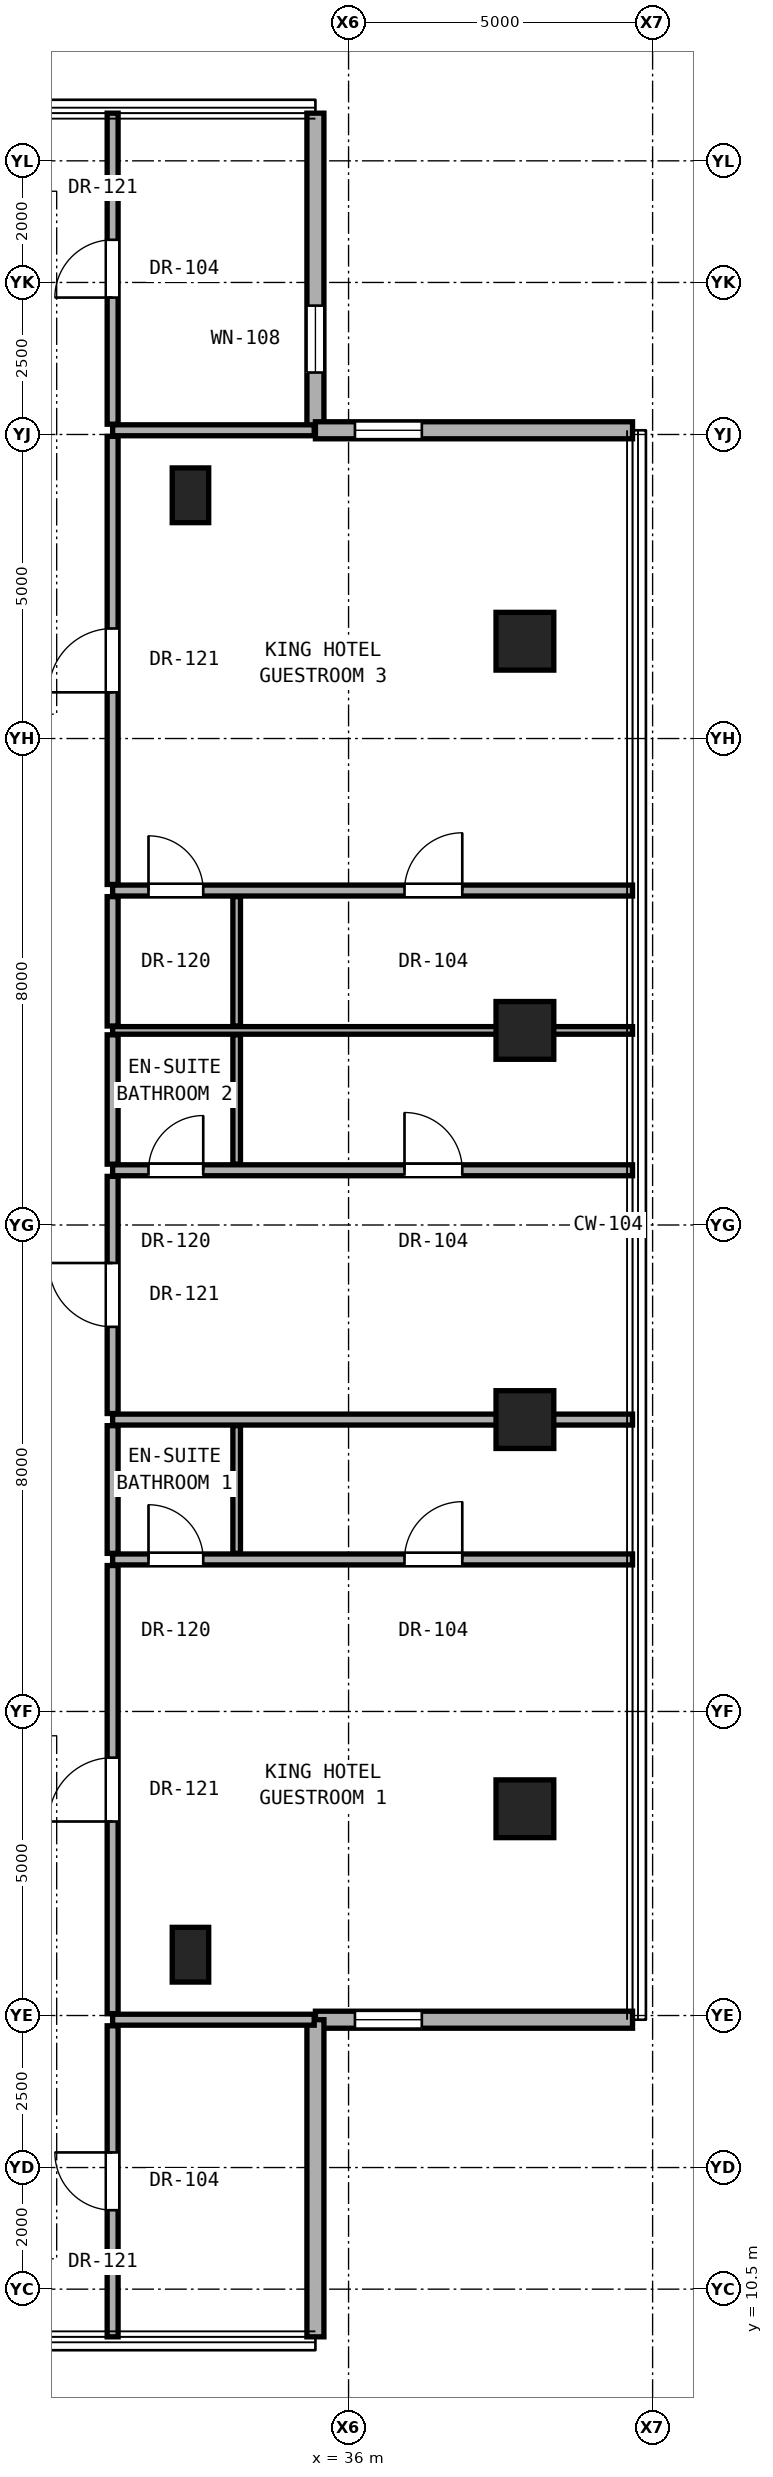
"""IFC4 building model, lengths in metres.
Left out: names, types, materials, properties, quantities, classifications, styles, units other than length and angle.
Written with IfcOpenShell. Run it as: python <this file> out.ifc"""

import sys

from ifc_helpers import new_model, si_unit, direction, frame, frame_2d, origin, origin_2d, place, context, subcontext, project, spatial, rectangle, hollow_rectangle, extrude, element, fill, save


model = new_model("IFC4")
c1 = context("Model", 3, precision=1e-05, world=origin(), true_north=direction((0.0, 1.0)))
c2 = subcontext(c1, "Body", "Model", "MODEL_VIEW")
j1 = project(units=[si_unit("LENGTHUNIT", "METRE"), si_unit("PLANEANGLEUNIT", "RADIAN")], contexts=[c1])
p1 = place(None, origin())
s1 = spatial("IfcSite", under=j1, at=p1, CompositionType="ELEMENT")
p2 = place(p1, origin())
s2 = spatial("IfcBuilding", under=s1, at=p2, CompositionType="ELEMENT")
p3 = place(p2, frame((0.0, 0.0, 193.4)))
s3 = spatial("IfcBuildingStorey", under=s2, at=p3, CompositionType="ELEMENT", Elevation=193.4)
for number, where, z_axis, x_axis in (
    (1, (38.9, 18.4, 0.0), (0.0, 0.0, 1.0), (1.0, 0.0, 0.0)),
    (2, (38.9, 24.8, 0.0), (0.0, 0.0, 1.0), (1.0, 0.0, 0.0)),
    (3, (38.9, 31.2, 0.0), (0.0, 0.0, 1.0), (1.0, 0.0, 0.0)),
    (4, (38.9, 37.6, 0.0), (0.0, 0.0, 1.0), (1.0, 0.0, 0.0)),
):
    element("IfcColumn", number, at=place(p3, frame(where, z_axis=z_axis, x_axis=x_axis)), inside=s3, PredefinedType="COLUMN", context=c2, shape_type="SweptSolid", body=[
        extrude(hollow_rectangle(XDim=0.95, YDim=0.95, WallThickness=0.05, at=origin_2d()), origin(), (0.0, 0.0, 1.0), 3.25),
    ])
for number, where, z_axis, x_axis in (
    (5, (33.4, 16.0, 0.0), (0.0, 0.0, 1.0), (1.0, 0.0, 0.0)),
    (6, (33.4, 40.0, 0.0), (0.0, 0.0, 1.0), (1.0, 0.0, 0.0)),
):
    element("IfcColumn", number, at=place(p3, frame(where, z_axis=z_axis, x_axis=x_axis)), inside=s3, PredefinedType="PILASTER", context=c2, shape_type="SweptSolid", body=[
        extrude(rectangle(XDim=0.6, YDim=0.9, at=origin_2d()), origin(), (0.0, 0.0, 1.0), 3.25),
    ])
p4 = place(p3, frame((35.455, 41.069, 0.0), z_axis=(0.0, 0.0, 1.0), x_axis=(0.0, 1.0, 0.0)))
e7 = element("IfcWall", 7, at=p4, inside=s3, PredefinedType="SOLIDWALL", context=c2, shape_type="SweptSolid", body=[
    extrude(rectangle(XDim=5.215, YDim=0.28, at=frame_2d((2.607, 0.0))), origin(), (0.0, 0.0, 1.0), 3.03),
])
p5 = place(p4, frame((0.95, 0.0, 0.85)))
e8 = element("IfcOpeningElement", 8, at=p5, cuts=e7, PredefinedType="OPENING", context=c2, shape_type="SweptSolid", body=[
    extrude(rectangle(XDim=1.1, YDim=2.0, at=frame_2d((0.55, 1.0))), frame((0.0, 0.15, 0.0), z_axis=(0.0, -1.0, 0.0), x_axis=(1.0, 0.0, 0.0)), (0.0, 0.0, 1.0), 0.3),
])
p6 = place(p3, frame((35.455, 14.931, 0.0), z_axis=(0.0, 0.0, 1.0), x_axis=(1.0, 0.0, 0.0)))
e9 = element("IfcWall", 9, at=p6, inside=s3, PredefinedType="SOLIDWALL", context=c2, shape_type="SweptSolid", body=[
    extrude(rectangle(XDim=5.215, YDim=0.28, at=frame_2d((2.607, 0.0))), origin(), (0.0, 0.0, 1.0), 3.03),
])
p7 = place(p6, frame((0.65, 0.0, 0.85)))
e10 = element("IfcOpeningElement", 10, at=p7, cuts=e9, PredefinedType="OPENING", context=c2, shape_type="SweptSolid", body=[
    extrude(rectangle(XDim=1.1, YDim=2.0, at=frame_2d((0.55, 1.0))), frame((0.0, 0.15, 0.0), z_axis=(0.0, -1.0, 0.0), x_axis=(1.0, 0.0, 0.0)), (0.0, 0.0, 1.0), 0.3),
])
p8 = place(p3, frame((35.455, 9.716, 0.0), z_axis=(0.0, 0.0, 1.0), x_axis=(0.0, 1.0, 0.0)))
e11 = element("IfcWall", 11, at=p8, inside=s3, PredefinedType="SOLIDWALL", context=c2, shape_type="SweptSolid", body=[
    extrude(rectangle(XDim=5.215, YDim=0.28, at=frame_2d((2.607, 0.0))), origin(), (0.0, 0.0, 1.0), 3.03),
])
p9 = place(p3, frame((40.67, 41.069, 0.0), z_axis=(0.0, 0.0, 1.0), x_axis=(-1.0, 0.0, 0.0)))
e12 = element("IfcWall", 12, at=p9, inside=s3, PredefinedType="SOLIDWALL", context=c2, shape_type="SweptSolid", body=[
    extrude(rectangle(XDim=5.215, YDim=0.28, at=frame_2d((2.607, 0.0))), origin(), (0.0, 0.0, 1.0), 3.03),
])
p10 = place(p9, frame((3.465, 0.0, 0.85)))
e13 = element("IfcOpeningElement", 13, at=p10, cuts=e12, PredefinedType="OPENING", context=c2, shape_type="SweptSolid", body=[
    extrude(rectangle(XDim=1.1, YDim=2.0, at=frame_2d((0.55, 1.0))), frame((0.0, 0.15, 0.0), z_axis=(0.0, -1.0, 0.0), x_axis=(1.0, 0.0, 0.0)), (0.0, 0.0, 1.0), 0.3),
])
p11 = place(p3, frame((32.12, 14.931, 0.0), z_axis=(0.0, 0.0, 1.0), x_axis=(1.0, 0.0, 0.0)))
e14 = element("IfcWall", 14, at=p11, inside=s3, PredefinedType="PARTITIONING", context=c2, shape_type="SweptSolid", body=[
    extrude(rectangle(XDim=3.315, YDim=0.18, at=frame_2d((1.657, 0.0))), origin(), (0.0, 0.0, 1.0), 3.05),
])
p12 = place(p3, frame((32.12, 22.5, 0.0), z_axis=(0.0, 0.0, 1.0), x_axis=(1.0, 0.0, 0.0)))
e15 = element("IfcWall", 15, at=p12, inside=s3, PredefinedType="PARTITIONING", context=c2, shape_type="SweptSolid", body=[
    extrude(rectangle(XDim=8.55, YDim=0.18, at=frame_2d((4.275, 0.0))), origin(), (0.0, 0.0, 1.0), 2.269),
])
p13 = place(p12, frame((4.8, 0.0, 0.0)))
e16 = element("IfcOpeningElement", 16, at=p13, cuts=e15, PredefinedType="OPENING", context=c2, shape_type="SweptSolid", body=[
    extrude(rectangle(XDim=0.95, YDim=2.15, at=frame_2d((0.475, 1.075))), frame((0.0, 0.1, 0.0), z_axis=(0.0, -1.0, 0.0), x_axis=(1.0, 0.0, 0.0)), (0.0, 0.0, 1.0), 0.2),
])
p14 = place(p12, frame((0.59, 0.0, 0.0)))
e17 = element("IfcOpeningElement", 17, at=p14, cuts=e15, PredefinedType="OPENING", context=c2, shape_type="SweptSolid", body=[
    extrude(rectangle(XDim=0.9, YDim=2.1, at=frame_2d((0.45, 1.05))), frame((0.0, 0.1, 0.0), z_axis=(0.0, -1.0, 0.0), x_axis=(1.0, 0.0, 0.0)), (0.0, 0.0, 1.0), 0.2),
])
p15 = place(p3, frame((32.12, 24.8, 0.0), z_axis=(0.0, 0.0, 1.0), x_axis=(1.0, 0.0, 0.0)))
e18 = element("IfcWall", 18, at=p15, inside=s3, PredefinedType="PARTITIONING", context=c2, shape_type="SweptSolid", body=[
    extrude(rectangle(XDim=8.55, YDim=0.18, at=frame_2d((4.275, 0.0))), origin(), (0.0, 0.0, 1.0), 2.269),
])
p16 = place(p3, frame((32.12, 28.9, 0.0), z_axis=(0.0, 0.0, 1.0), x_axis=(1.0, 0.0, 0.0)))
e19 = element("IfcWall", 19, at=p16, inside=s3, PredefinedType="PARTITIONING", context=c2, shape_type="SweptSolid", body=[
    extrude(rectangle(XDim=8.55, YDim=0.18, at=frame_2d((4.275, 0.0))), origin(), (0.0, 0.0, 1.0), 2.269),
])
p17 = place(p16, frame((4.8, 0.0, 0.0)))
e20 = element("IfcOpeningElement", 20, at=p17, cuts=e19, PredefinedType="OPENING", context=c2, shape_type="SweptSolid", body=[
    extrude(rectangle(XDim=0.95, YDim=2.15, at=frame_2d((0.475, 1.075))), frame((0.0, 0.1, 0.0), z_axis=(0.0, -1.0, 0.0), x_axis=(1.0, 0.0, 0.0)), (0.0, 0.0, 1.0), 0.2),
])
p18 = place(p16, frame((0.59, 0.0, 0.0)))
e21 = element("IfcOpeningElement", 21, at=p18, cuts=e19, PredefinedType="OPENING", context=c2, shape_type="SweptSolid", body=[
    extrude(rectangle(XDim=0.9, YDim=2.1, at=frame_2d((0.45, 1.05))), frame((0.0, 0.1, 0.0), z_axis=(0.0, -1.0, 0.0), x_axis=(1.0, 0.0, 0.0)), (0.0, 0.0, 1.0), 0.2),
])
p19 = place(p3, frame((32.12, 31.2, 0.0), z_axis=(0.0, 0.0, 1.0), x_axis=(1.0, 0.0, 0.0)))
e22 = element("IfcWall", 22, at=p19, inside=s3, PredefinedType="PARTITIONING", context=c2, shape_type="SweptSolid", body=[
    extrude(rectangle(XDim=8.55, YDim=0.125, at=frame_2d((4.275, 0.0))), origin(), (0.0, 0.0, 1.0), 2.269),
])
p20 = place(p3, frame((32.12, 33.5, 0.0), z_axis=(0.0, 0.0, 1.0), x_axis=(1.0, 0.0, 0.0)))
e23 = element("IfcWall", 23, at=p20, inside=s3, PredefinedType="PARTITIONING", context=c2, shape_type="SweptSolid", body=[
    extrude(rectangle(XDim=8.55, YDim=0.18, at=frame_2d((4.275, 0.0))), origin(), (0.0, 0.0, 1.0), 2.269),
])
p21 = place(p20, frame((4.8, 0.0, 0.0)))
e24 = element("IfcOpeningElement", 24, at=p21, cuts=e23, PredefinedType="OPENING", context=c2, shape_type="SweptSolid", body=[
    extrude(rectangle(XDim=0.95, YDim=2.15, at=frame_2d((0.475, 1.075))), frame((0.0, 0.1, 0.0), z_axis=(0.0, -1.0, 0.0), x_axis=(1.0, 0.0, 0.0)), (0.0, 0.0, 1.0), 0.2),
])
p22 = place(p20, frame((0.59, 0.0, 0.0)))
e25 = element("IfcOpeningElement", 25, at=p22, cuts=e23, PredefinedType="OPENING", context=c2, shape_type="SweptSolid", body=[
    extrude(rectangle(XDim=0.9, YDim=2.1, at=frame_2d((0.45, 1.05))), frame((0.0, 0.1, 0.0), z_axis=(0.0, -1.0, 0.0), x_axis=(1.0, 0.0, 0.0)), (0.0, 0.0, 1.0), 0.2),
])
p23 = place(p3, frame((32.12, 41.069, 0.0), z_axis=(0.0, 0.0, 1.0), x_axis=(1.0, 0.0, 0.0)))
e26 = element("IfcWall", 26, at=p23, inside=s3, PredefinedType="PARTITIONING", context=c2, shape_type="SweptSolid", body=[
    extrude(rectangle(XDim=3.315, YDim=0.18, at=frame_2d((1.657, 0.0))), origin(), (0.0, 0.0, 1.0), 3.05),
])
p24 = place(p3, frame((32.12, 9.716, 0.0), z_axis=(0.0, 0.0, 1.0), x_axis=(0.0, 1.0, 0.0)))
e27 = element("IfcWall", 27, at=p24, inside=s3, PredefinedType="PARTITIONING", context=c2, shape_type="SweptSolid", body=[
    extrude(rectangle(XDim=5.115, YDim=0.18, at=frame_2d((2.558, 0.0))), origin(), (0.0, 0.0, 1.0), 3.05),
])
p25 = place(p24, frame((2.083, 0.0, 0.0)))
e28 = element("IfcOpeningElement", 28, at=p25, cuts=e27, PredefinedType="OPENING", context=c2, shape_type="SweptSolid", body=[
    extrude(rectangle(XDim=0.95, YDim=2.15, at=frame_2d((0.475, 1.075))), frame((0.0, 0.1, 0.0), z_axis=(0.0, -1.0, 0.0), x_axis=(1.0, 0.0, 0.0)), (0.0, 0.0, 1.0), 0.2),
])
p26 = place(p3, frame((32.12, 15.031, 0.0), z_axis=(0.0, 0.0, 1.0), x_axis=(0.0, 1.0, 0.0)))
e29 = element("IfcWall", 29, at=p26, inside=s3, PredefinedType="PARTITIONING", context=c2, shape_type="SweptSolid", body=[
    extrude(rectangle(XDim=7.369, YDim=0.18, at=frame_2d((3.685, 0.0))), origin(), (0.0, 0.0, 1.0), 2.442),
])
p27 = place(p26, frame((3.159, 0.0, 0.0)))
e30 = element("IfcOpeningElement", 30, at=p27, cuts=e29, PredefinedType="OPENING", context=c2, shape_type="SweptSolid", body=[
    extrude(rectangle(XDim=1.05, YDim=2.2, at=frame_2d((0.525, 1.1))), frame((0.0, 0.1, 0.0), z_axis=(0.0, -1.0, 0.0), x_axis=(1.0, 0.0, 0.0)), (0.0, 0.0, 1.0), 0.2),
])
p28 = place(p3, frame((32.12, 22.6, 0.0), z_axis=(0.0, 0.0, 1.0), x_axis=(0.0, 1.0, 0.0)))
e31 = element("IfcWall", 31, at=p28, inside=s3, PredefinedType="PARTITIONING", context=c2, shape_type="SweptSolid", body=[
    extrude(rectangle(XDim=2.1, YDim=0.18, at=frame_2d((1.05, 0.0))), origin(), (0.0, 0.0, 1.0), 2.346),
])
p29 = place(p3, frame((32.12, 24.9, 0.0), z_axis=(0.0, 0.0, 1.0), x_axis=(0.0, 1.0, 0.0)))
e32 = element("IfcWall", 32, at=p29, inside=s3, PredefinedType="PARTITIONING", context=c2, shape_type="SweptSolid", body=[
    extrude(rectangle(XDim=3.9, YDim=0.18, at=frame_2d((1.95, 0.0))), origin(), (0.0, 0.0, 1.0), 2.346),
])
p30 = place(p29, frame((1.425, 0.0, 0.0)))
e33 = element("IfcOpeningElement", 33, at=p30, cuts=e32, PredefinedType="OPENING", context=c2, shape_type="SweptSolid", body=[
    extrude(rectangle(XDim=1.05, YDim=2.2, at=frame_2d((0.525, 1.1))), frame((0.0, 0.1, 0.0), z_axis=(0.0, -1.0, 0.0), x_axis=(1.0, 0.0, 0.0)), (0.0, 0.0, 1.0), 0.2),
])
for number, where, z_axis, x_axis in (
    (34, (32.12, 29.0, 0.0), (0.0, 0.0, 1.0), (0.0, 1.0, 0.0)),
    (35, (32.12, 31.272, 0.0), (0.0, 0.0, 1.0), (0.0, 1.0, 0.0)),
):
    element("IfcWall", number, at=place(p3, frame(where, z_axis=z_axis, x_axis=x_axis)), inside=s3, PredefinedType="PARTITIONING", context=c2, shape_type="SweptSolid", body=[
        extrude(rectangle(XDim=2.127, YDim=0.18, at=frame_2d((1.064, 0.0))), origin(), (0.0, 0.0, 1.0), 2.346),
    ])
p31 = place(p3, frame((32.12, 33.6, 0.0), z_axis=(0.0, 0.0, 1.0), x_axis=(0.0, 1.0, 0.0)))
e36 = element("IfcWall", 36, at=p31, inside=s3, PredefinedType="PARTITIONING", context=c2, shape_type="SweptSolid", body=[
    extrude(rectangle(XDim=7.369, YDim=0.18, at=frame_2d((3.685, 0.0))), origin(), (0.0, 0.0, 1.0), 2.442),
])
p32 = place(p31, frame((3.159, 0.0, 0.0)))
e37 = element("IfcOpeningElement", 37, at=p32, cuts=e36, PredefinedType="OPENING", context=c2, shape_type="SweptSolid", body=[
    extrude(rectangle(XDim=1.05, YDim=2.2, at=frame_2d((0.525, 1.1))), frame((0.0, 0.1, 0.0), z_axis=(0.0, -1.0, 0.0), x_axis=(1.0, 0.0, 0.0)), (0.0, 0.0, 1.0), 0.2),
])
p33 = place(p3, frame((32.12, 41.169, 0.0), z_axis=(0.0, 0.0, 1.0), x_axis=(0.0, 1.0, 0.0)))
e38 = element("IfcWall", 38, at=p33, inside=s3, PredefinedType="PARTITIONING", context=c2, shape_type="SweptSolid", body=[
    extrude(rectangle(XDim=5.115, YDim=0.18, at=frame_2d((2.558, 0.0))), origin(), (0.0, 0.0, 1.0), 3.05),
])
p34 = place(p33, frame((2.083, 0.0, 0.0)))
e39 = element("IfcOpeningElement", 39, at=p34, cuts=e38, PredefinedType="OPENING", context=c2, shape_type="SweptSolid", body=[
    extrude(rectangle(XDim=0.95, YDim=2.15, at=frame_2d((0.475, 1.075))), frame((0.0, 0.1, 0.0), z_axis=(0.0, -1.0, 0.0), x_axis=(1.0, 0.0, 0.0)), (0.0, 0.0, 1.0), 0.2),
])
p35 = place(p3, frame((34.16, 22.6, 0.0), z_axis=(0.0, 0.0, 1.0), x_axis=(0.0, 1.0, 0.0)))
e40 = element("IfcWall", 40, at=p35, inside=s3, PredefinedType="PARTITIONING", context=c2, shape_type="SweptSolid", body=[
    extrude(rectangle(XDim=2.1, YDim=0.125, at=frame_2d((1.05, 0.0))), origin(), (0.0, 0.0, 1.0), 2.346),
])
for number, where, z_axis, x_axis in (
    (41, (34.16, 29.0, 0.0), (0.0, 0.0, 1.0), (0.0, 1.0, 0.0)),
    (42, (34.16, 31.272, 0.0), (0.0, 0.0, 1.0), (0.0, 1.0, 0.0)),
):
    element("IfcWall", number, at=place(p3, frame(where, z_axis=z_axis, x_axis=x_axis)), inside=s3, PredefinedType="PARTITIONING", context=c2, shape_type="SweptSolid", body=[
        extrude(rectangle(XDim=2.127, YDim=0.125, at=frame_2d((1.064, 0.0))), origin(), (0.0, 0.0, 1.0), 2.346),
    ])
p36 = place(p5, origin())
e43 = element("IfcWindow", 43, at=p36, inside=s3, PartitioningType="SINGLE_PANEL", PredefinedType="WINDOW", context=c2, shape_type="SweptSolid", body=[
    extrude(rectangle(XDim=1.1, YDim=2.0, at=frame_2d((0.55, 1.0))), frame((0.0, 0.03, 0.0), z_axis=(0.0, -1.0, 0.0), x_axis=(1.0, 0.0, 0.0)), (0.0, 0.0, 1.0), 0.06),
])
fill(e8, e43)
p37 = place(p7, origin())
e44 = element("IfcWindow", 44, at=p37, inside=s3, PartitioningType="SINGLE_PANEL", PredefinedType="WINDOW", context=c2, shape_type="SweptSolid", body=[
    extrude(rectangle(XDim=1.1, YDim=2.0, at=frame_2d((0.55, 1.0))), frame((0.0, 0.03, 0.0), z_axis=(0.0, -1.0, 0.0), x_axis=(1.0, 0.0, 0.0)), (0.0, 0.0, 1.0), 0.06),
])
fill(e10, e44)
p38 = place(p10, origin())
e45 = element("IfcWindow", 45, at=p38, inside=s3, PartitioningType="SINGLE_PANEL", PredefinedType="WINDOW", context=c2, shape_type="SweptSolid", body=[
    extrude(rectangle(XDim=1.1, YDim=2.0, at=frame_2d((0.55, 1.0))), frame((0.0, 0.03, 0.0), z_axis=(0.0, -1.0, 0.0), x_axis=(1.0, 0.0, 0.0)), (0.0, 0.0, 1.0), 0.06),
])
fill(e13, e45)
p39 = place(p27, origin())
e46 = element("IfcDoor", 46, at=p39, inside=s3, OperationType="SINGLE_SWING_LEFT", PredefinedType="DOOR", context=c2, shape_type="SweptSolid", body=[
    extrude(rectangle(XDim=1.05, YDim=2.2, at=frame_2d((0.525, 1.1))), frame((0.0, 0.025, 0.0), z_axis=(0.0, -1.0, 0.0), x_axis=(1.0, 0.0, 0.0)), (0.0, 0.0, 1.0), 0.05),
])
fill(e30, e46)
p40 = place(p13, origin())
e47 = element("IfcDoor", 47, at=p40, inside=s3, OperationType="SINGLE_SWING_RIGHT", PredefinedType="DOOR", context=c2, shape_type="SweptSolid", body=[
    extrude(rectangle(XDim=0.95, YDim=2.15, at=frame_2d((0.475, 1.075))), frame((0.0, 0.025, 0.0), z_axis=(0.0, -1.0, 0.0), x_axis=(1.0, 0.0, 0.0)), (0.0, 0.0, 1.0), 0.05),
])
fill(e16, e47)
p41 = place(p14, origin())
e48 = element("IfcDoor", 48, at=p41, inside=s3, OperationType="SINGLE_SWING_LEFT", PredefinedType="DOOR", context=c2, shape_type="SweptSolid", body=[
    extrude(rectangle(XDim=0.9, YDim=2.1, at=frame_2d((0.45, 1.05))), frame((0.0, 0.025, 0.0), z_axis=(0.0, -1.0, 0.0), x_axis=(1.0, 0.0, 0.0)), (0.0, 0.0, 1.0), 0.05),
])
fill(e17, e48)
p42 = place(p30, origin())
e49 = element("IfcDoor", 49, at=p42, inside=s3, OperationType="SINGLE_SWING_RIGHT", PredefinedType="DOOR", context=c2, shape_type="SweptSolid", body=[
    extrude(rectangle(XDim=1.05, YDim=2.2, at=frame_2d((0.525, 1.1))), frame((0.0, 0.025, 0.0), z_axis=(0.0, -1.0, 0.0), x_axis=(1.0, 0.0, 0.0)), (0.0, 0.0, 1.0), 0.05),
])
fill(e33, e49)
p43 = place(p17, origin())
e50 = element("IfcDoor", 50, at=p43, inside=s3, OperationType="SINGLE_SWING_LEFT", PredefinedType="DOOR", context=c2, shape_type="SweptSolid", body=[
    extrude(rectangle(XDim=0.95, YDim=2.15, at=frame_2d((0.475, 1.075))), frame((0.0, 0.025, 0.0), z_axis=(0.0, -1.0, 0.0), x_axis=(1.0, 0.0, 0.0)), (0.0, 0.0, 1.0), 0.05),
])
fill(e20, e50)
p44 = place(p18, origin())
e51 = element("IfcDoor", 51, at=p44, inside=s3, OperationType="SINGLE_SWING_RIGHT", PredefinedType="DOOR", context=c2, shape_type="SweptSolid", body=[
    extrude(rectangle(XDim=0.9, YDim=2.1, at=frame_2d((0.45, 1.05))), frame((0.0, 0.025, 0.0), z_axis=(0.0, -1.0, 0.0), x_axis=(1.0, 0.0, 0.0)), (0.0, 0.0, 1.0), 0.05),
])
fill(e21, e51)
p45 = place(p32, origin())
e52 = element("IfcDoor", 52, at=p45, inside=s3, OperationType="SINGLE_SWING_LEFT", PredefinedType="DOOR", context=c2, shape_type="SweptSolid", body=[
    extrude(rectangle(XDim=1.05, YDim=2.2, at=frame_2d((0.525, 1.1))), frame((0.0, 0.025, 0.0), z_axis=(0.0, -1.0, 0.0), x_axis=(1.0, 0.0, 0.0)), (0.0, 0.0, 1.0), 0.05),
])
fill(e37, e52)
p46 = place(p21, origin())
e53 = element("IfcDoor", 53, at=p46, inside=s3, OperationType="SINGLE_SWING_RIGHT", PredefinedType="DOOR", context=c2, shape_type="SweptSolid", body=[
    extrude(rectangle(XDim=0.95, YDim=2.15, at=frame_2d((0.475, 1.075))), frame((0.0, 0.025, 0.0), z_axis=(0.0, -1.0, 0.0), x_axis=(1.0, 0.0, 0.0)), (0.0, 0.0, 1.0), 0.05),
])
fill(e24, e53)
p47 = place(p22, origin())
e54 = element("IfcDoor", 54, at=p47, inside=s3, OperationType="SINGLE_SWING_LEFT", PredefinedType="DOOR", context=c2, shape_type="SweptSolid", body=[
    extrude(rectangle(XDim=0.9, YDim=2.1, at=frame_2d((0.45, 1.05))), frame((0.0, 0.025, 0.0), z_axis=(0.0, -1.0, 0.0), x_axis=(1.0, 0.0, 0.0)), (0.0, 0.0, 1.0), 0.05),
])
fill(e25, e54)
p48 = place(p25, origin())
e55 = element("IfcDoor", 55, at=p48, inside=s3, OperationType="SINGLE_SWING_RIGHT", PredefinedType="DOOR", context=c2, shape_type="SweptSolid", body=[
    extrude(rectangle(XDim=0.95, YDim=2.15, at=frame_2d((0.475, 1.075))), frame((0.0, 0.025, 0.0), z_axis=(0.0, -1.0, 0.0), x_axis=(1.0, 0.0, 0.0)), (0.0, 0.0, 1.0), 0.05),
])
fill(e28, e55)
p49 = place(p34, origin())
e56 = element("IfcDoor", 56, at=p49, inside=s3, OperationType="SINGLE_SWING_LEFT", PredefinedType="DOOR", context=c2, shape_type="SweptSolid", body=[
    extrude(rectangle(XDim=0.95, YDim=2.15, at=frame_2d((0.475, 1.075))), frame((0.0, 0.025, 0.0), z_axis=(0.0, -1.0, 0.0), x_axis=(1.0, 0.0, 0.0)), (0.0, 0.0, 1.0), 0.05),
])
fill(e39, e56)
save(model, sys.argv[1])
